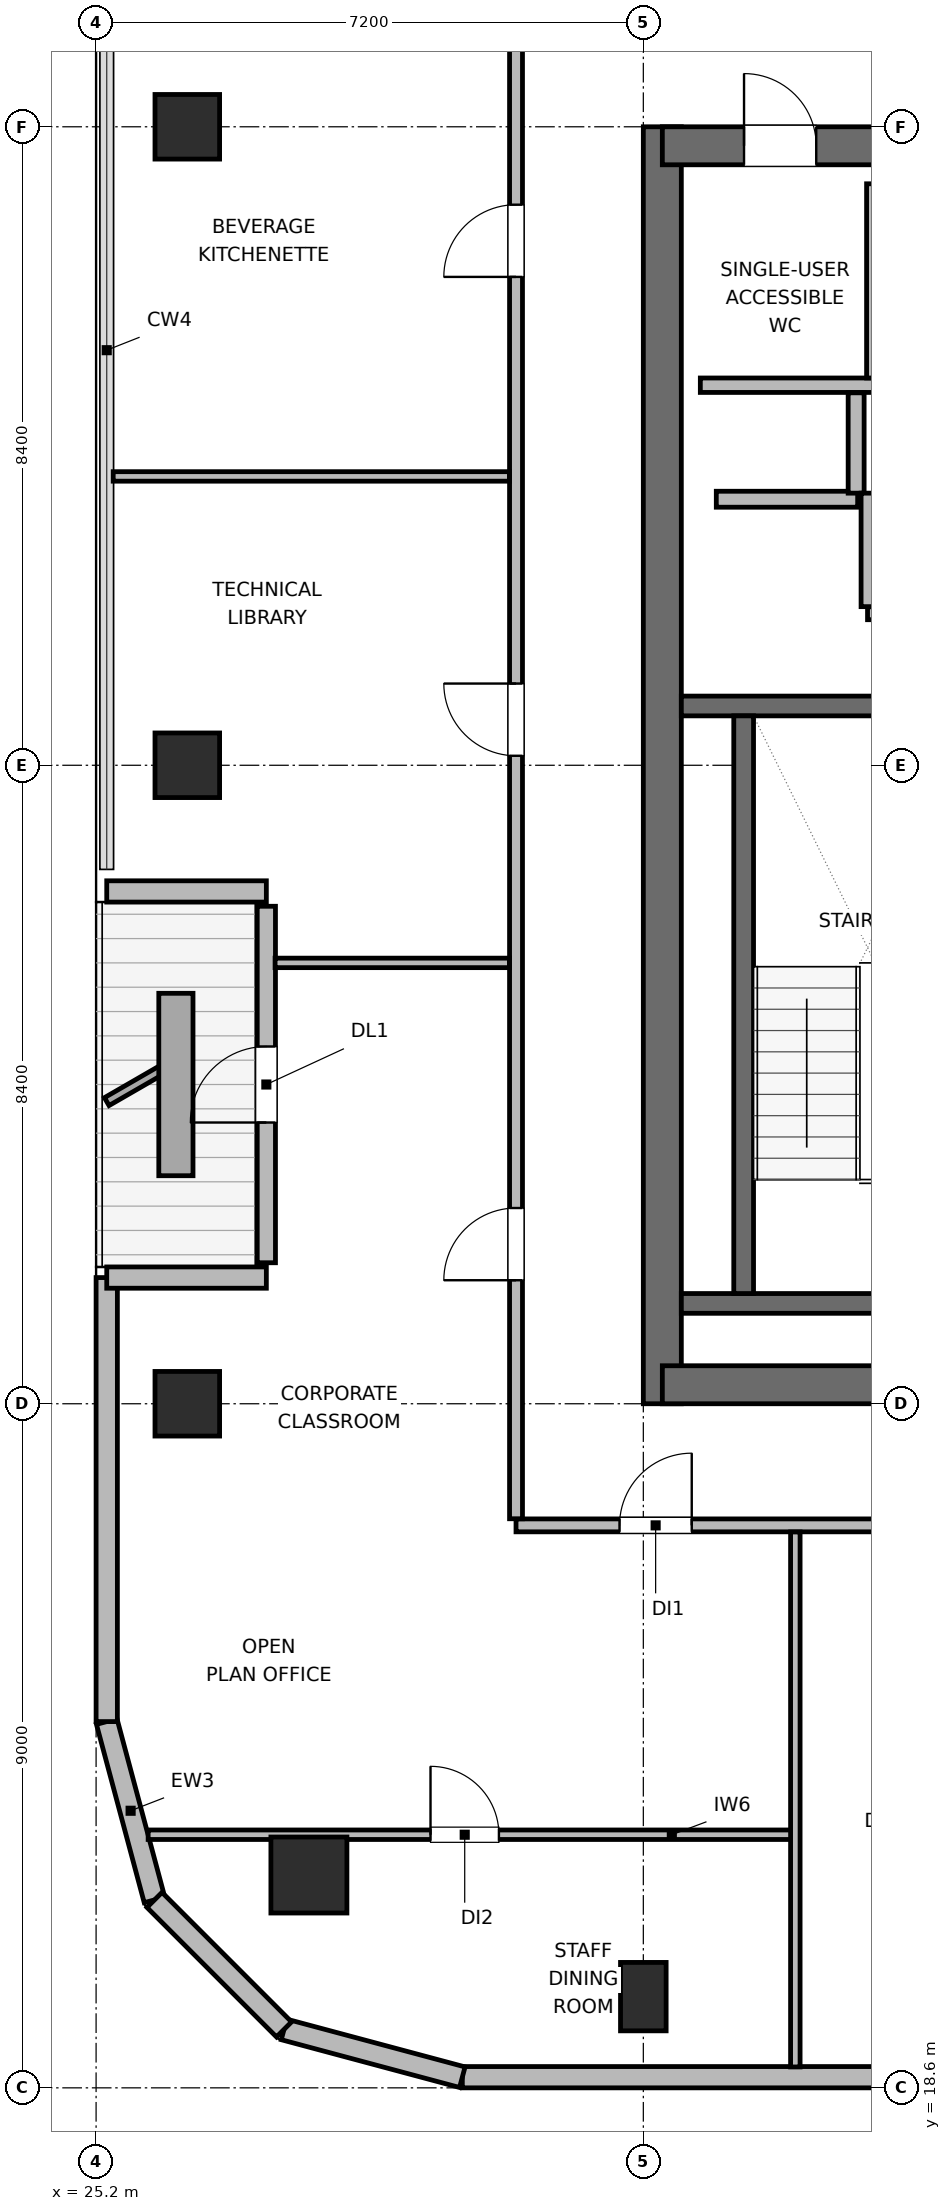
"""IFC4 building model, lengths in metres.
Left out: names, types, materials, properties, quantities, classifications, styles, units other than length and angle.
Written with IfcOpenShell. Run it as: python <this file> out.ifc"""

import sys

from ifc_helpers import new_model, si_unit, direction, frame, frame_2d, origin, origin_2d, place, context, subcontext, project, spatial, rectangle, circle, extrude, element, fill, save


model = new_model("IFC4")
c1 = context("Model", 3, precision=1e-05, world=origin(), true_north=direction((0.0, 1.0)))
c2 = subcontext(c1, "Body", "Model", "MODEL_VIEW")
j1 = project(units=[si_unit("LENGTHUNIT", "METRE"), si_unit("PLANEANGLEUNIT", "RADIAN")], contexts=[c1])
p1 = place(None, origin())
s1 = spatial("IfcSite", under=j1, at=p1, CompositionType="ELEMENT")
p2 = place(p1, origin())
s2 = spatial("IfcBuilding", under=s1, at=p2, CompositionType="ELEMENT")
p3 = place(p2, frame((0.0, 0.0, 302.4)))
s3 = spatial("IfcBuildingStorey", under=s2, at=p3, CompositionType="ELEMENT", Elevation=302.4)
p4 = place(p3, frame((32.65, 27.6, 0.0), z_axis=(0.0, 0.0, 1.0), x_axis=(0.0, 1.0, 0.0)))
e1 = element("IfcWall", 1, at=p4, inside=s3, PredefinedType="SHEAR", context=c2, shape_type="SweptSolid", body=[
    extrude(rectangle(XDim=16.8, YDim=0.5, at=frame_2d((8.4, 0.0))), origin(), (0.0, 0.0, 1.0), 3.9),
])
p5 = place(p3, frame((32.65, 27.85, 0.0), z_axis=(0.0, 0.0, 1.0), x_axis=(1.0, 0.0, 0.0)))
e2 = element("IfcWall", 2, at=p5, inside=s3, PredefinedType="SHEAR", context=c2, shape_type="SweptSolid", body=[
    extrude(rectangle(XDim=9.5, YDim=0.5, at=frame_2d((4.75, 0.0))), origin(), (0.0, 0.0, 1.0), 3.9),
])
p6 = place(p5, frame((5.075, 0.0, 0.0)))
e3 = element("IfcOpeningElement", 3, at=p6, cuts=e2, PredefinedType="OPENING", context=c2, shape_type="SweptSolid", body=[
    extrude(rectangle(XDim=1.05, YDim=2.04, at=frame_2d((0.525, 1.02))), frame((0.0, 0.26, 0.0), z_axis=(0.0, -1.0, 0.0), x_axis=(1.0, 0.0, 0.0)), (0.0, 0.0, 1.0), 0.52),
])
p7 = place(p3, frame((32.65, 44.15, 0.0), z_axis=(0.0, 0.0, 1.0), x_axis=(1.0, 0.0, 0.0)))
e4 = element("IfcWall", 4, at=p7, inside=s3, PredefinedType="SHEAR", context=c2, shape_type="SweptSolid", body=[
    extrude(rectangle(XDim=9.5, YDim=0.5, at=frame_2d((4.75, 0.0))), origin(), (0.0, 0.0, 1.0), 3.9),
])
p8 = place(p7, frame((1.075, 0.0, 0.0)))
e5 = element("IfcOpeningElement", 5, at=p8, cuts=e4, PredefinedType="OPENING", context=c2, shape_type="SweptSolid", body=[
    extrude(rectangle(XDim=0.95, YDim=2.04, at=frame_2d((0.475, 1.02))), frame((0.0, 0.26, 0.0), z_axis=(0.0, -1.0, 0.0), x_axis=(1.0, 0.0, 0.0)), (0.0, 0.0, 1.0), 0.52),
])
p9 = place(p7, frame((4.325, 0.0, 0.0)))
e6 = element("IfcOpeningElement", 6, at=p9, cuts=e4, PredefinedType="OPENING", context=c2, shape_type="SweptSolid", body=[
    extrude(rectangle(XDim=0.9, YDim=2.02, at=frame_2d((0.45, 1.01))), frame((0.0, 0.26, 0.0), z_axis=(0.0, -1.0, 0.0), x_axis=(1.0, 0.0, 0.0)), (0.0, 0.0, 1.0), 0.52),
])
p10 = place(p7, frame((7.225, 0.0, 0.0)))
e7 = element("IfcOpeningElement", 7, at=p10, cuts=e4, PredefinedType="OPENING", context=c2, shape_type="SweptSolid", body=[
    extrude(rectangle(XDim=0.9, YDim=2.02, at=frame_2d((0.45, 1.01))), frame((0.0, 0.26, 0.0), z_axis=(0.0, -1.0, 0.0), x_axis=(1.0, 0.0, 0.0)), (0.0, 0.0, 1.0), 0.52),
])
for number, where, z_axis, x_axis in (
    (8, (32.9, 28.92, 0.0), (0.0, 0.0, 1.0), (1.0, 0.0, 0.0)),
    (9, (32.9, 36.78, 0.0), (0.0, 0.0, 1.0), (1.0, 0.0, 0.0)),
):
    element("IfcWall", number, at=place(p3, frame(where, z_axis=z_axis, x_axis=x_axis)), inside=s3, PredefinedType="SHEAR", context=c2, shape_type="SweptSolid", body=[
        extrude(rectangle(XDim=4.21, YDim=0.26, at=frame_2d((2.105, 0.0))), origin(), (0.0, 0.0, 1.0), 3.9),
    ])
p11 = place(p3, frame((33.72, 29.05, 0.0), z_axis=(0.0, 0.0, 1.0), x_axis=(0.0, 1.0, 0.0)))
e10 = element("IfcWall", 10, at=p11, inside=s3, PredefinedType="SHEAR", context=c2, shape_type="SweptSolid", body=[
    extrude(rectangle(XDim=7.6, YDim=0.26, at=frame_2d((3.8, 0.0))), origin(), (0.0, 0.0, 1.0), 3.9),
])
p12 = place(p3, frame((28.0, 21.4, 0.0), z_axis=(0.0, 0.0, 1.0), x_axis=(1.0, 0.0, 0.0)))
e11 = element("IfcColumn", 11, at=p12, inside=s3, PredefinedType="COLUMN", context=c2, shape_type="SweptSolid", body=[
    extrude(circle(Radius=0.5, at=origin_2d()), origin(), (0.0, 0.0, 1.0), 3.9),
])
p13 = place(p3, frame((32.4, 19.8, 0.0), z_axis=(0.0, 0.0, 1.0), x_axis=(1.0, 0.0, 0.0)))
e12 = element("IfcColumn", 12, at=p13, inside=s3, PredefinedType="COLUMN", context=c2, shape_type="SweptSolid", body=[
    extrude(rectangle(XDim=0.6, YDim=0.9, at=origin_2d()), origin(), (0.0, 0.0, 1.0), 3.9),
])
for number, where, z_axis, x_axis in (
    (13, (26.4, 27.6, 0.0), (0.0, 0.0, 1.0), (1.0, 0.0, 0.0)),
    (14, (26.4, 36.0, 0.0), (0.0, 0.0, 1.0), (1.0, 0.0, 0.0)),
    (15, (26.4, 44.4, 0.0), (0.0, 0.0, 1.0), (1.0, 0.0, 0.0)),
):
    element("IfcColumn", number, at=place(p3, frame(where, z_axis=z_axis, x_axis=x_axis)), inside=s3, PredefinedType="COLUMN", context=c2, shape_type="SweptSolid", body=[
        extrude(rectangle(XDim=0.85, YDim=0.85, at=origin_2d()), origin(), (0.0, 0.0, 1.0), 3.9),
    ])
p14 = place(p3, frame((25.969, 21.073, 0.0), z_axis=(0.0, 0.0, 1.0), x_axis=(-0.258751159445, 0.965944013639, 0.0)))
e16 = element("IfcWall", 16, at=p14, inside=s3, PredefinedType="SOLIDWALL", context=c2, shape_type="SweptSolid", body=[
    extrude(rectangle(XDim=2.429, YDim=0.28, at=frame_2d((1.214, 0.0))), origin(), (0.0, 0.0, 1.0), 3.68),
])
p15 = place(p3, frame((25.34, 23.418, 0.0), z_axis=(0.0, 0.0, 1.0), x_axis=(0.0, 1.0, 0.0)))
e17 = element("IfcWall", 17, at=p15, inside=s3, PredefinedType="SOLIDWALL", context=c2, shape_type="SweptSolid", body=[
    extrude(rectangle(XDim=5.842, YDim=0.28, at=frame_2d((2.921, 0.0))), origin(), (0.0, 0.0, 1.0), 3.68),
])
p16 = place(p3, frame((25.34, 29.26, 0.0), z_axis=(0.0, 0.0, 1.0), x_axis=(1.0, 0.0, 0.0)))
e18 = element("IfcWall", 18, at=p16, inside=s3, PredefinedType="SOLIDWALL", context=c2, shape_type="SweptSolid", body=[
    extrude(rectangle(XDim=2.1, YDim=0.28, at=frame_2d((1.05, 0.0))), origin(), (0.0, 0.0, 1.0), 3.126),
])
p17 = place(p3, frame((27.44, 29.455, 0.0), z_axis=(0.0, 0.0, 1.0), x_axis=(0.0, 1.0, 0.0)))
e19 = element("IfcWall", 19, at=p17, inside=s3, PredefinedType="SOLIDWALL", context=c2, shape_type="SweptSolid", body=[
    extrude(rectangle(XDim=4.69, YDim=0.24, at=frame_2d((2.345, 0.0))), origin(), (0.0, 0.0, 1.0), 3.311),
])
p18 = place(p17, frame((1.845, 0.0, 0.0)))
e20 = element("IfcOpeningElement", 20, at=p18, cuts=e19, PredefinedType="OPENING", context=c2, shape_type="SweptSolid", body=[
    extrude(rectangle(XDim=1.0, YDim=2.02, at=frame_2d((0.5, 1.01))), frame((0.0, 0.13, 0.0), z_axis=(0.0, -1.0, 0.0), x_axis=(1.0, 0.0, 0.0)), (0.0, 0.0, 1.0), 0.26),
])
p19 = place(p3, frame((27.44, 34.34, 0.0), z_axis=(0.0, 0.0, 1.0), x_axis=(-1.0, 0.0, 0.0)))
e21 = element("IfcWall", 21, at=p19, inside=s3, PredefinedType="SOLIDWALL", context=c2, shape_type="SweptSolid", body=[
    extrude(rectangle(XDim=2.1, YDim=0.28, at=frame_2d((1.05, 0.0))), origin(), (0.0, 0.0, 1.0), 3.126),
])
p20 = place(p3, frame((41.369, 18.74, 0.0), z_axis=(0.0, 0.0, 1.0), x_axis=(-1.0, 0.0, 0.0)))
e22 = element("IfcWall", 22, at=p20, inside=s3, PredefinedType="SOLIDWALL", context=c2, shape_type="SweptSolid", body=[
    extrude(rectangle(XDim=11.351, YDim=0.28, at=frame_2d((5.675, 0.0))), origin(), (0.0, 0.0, 1.0), 3.68),
])
p21 = place(p3, frame((30.018, 18.74, 0.0), z_axis=(0.0, 0.0, 1.0), x_axis=(-0.965937282298, 0.25877628691, 0.0)))
e23 = element("IfcWall", 23, at=p21, inside=s3, PredefinedType="SOLIDWALL", context=c2, shape_type="SweptSolid", body=[
    extrude(rectangle(XDim=2.428, YDim=0.28, at=frame_2d((1.214, 0.0))), origin(), (0.0, 0.0, 1.0), 3.68),
])
p22 = place(p3, frame((27.673, 19.368, 0.0), z_axis=(0.0, 0.0, 1.0), x_axis=(-0.707106781187, 0.707106781187, 0.0)))
e24 = element("IfcWall", 24, at=p22, inside=s3, PredefinedType="SOLIDWALL", context=c2, shape_type="SweptSolid", body=[
    extrude(rectangle(XDim=2.41, YDim=0.28, at=frame_2d((1.205, 0.0))), origin(), (0.0, 0.0, 1.0), 3.68),
])
p23 = place(p3, frame((33.15, 41.0, 0.0), z_axis=(0.0, 0.0, 1.0), x_axis=(1.0, 0.0, 0.0)))
e25 = element("IfcWall", 25, at=p23, inside=s3, PredefinedType="PLUMBINGWALL", context=c2, shape_type="SweptSolid", body=[
    extrude(rectangle(XDim=8.5, YDim=0.19, at=frame_2d((4.25, 0.0))), origin(), (0.0, 0.0, 1.0), 3.68),
])
p24 = place(p3, frame((35.4, 41.095, 0.0), z_axis=(0.0, 0.0, 1.0), x_axis=(0.0, 1.0, 0.0)))
e26 = element("IfcWall", 26, at=p24, inside=s3, PredefinedType="PARTITIONING", context=c2, shape_type="SweptSolid", body=[
    extrude(rectangle(XDim=2.555, YDim=0.125, at=frame_2d((1.277, 0.0))), origin(), (0.0, 0.0, 1.0), 3.68),
])
p25 = place(p3, frame((33.36, 39.5, 0.0), z_axis=(0.0, 0.0, 1.0), x_axis=(1.0, 0.0, 0.0)))
e27 = element("IfcWall", 27, at=p25, inside=s3, PredefinedType="PARTITIONING", context=c2, shape_type="SweptSolid", body=[
    extrude(rectangle(XDim=1.86, YDim=0.21, at=frame_2d((0.93, 0.0))), origin(), (0.0, 0.0, 1.0), 3.68),
])
p26 = place(p3, frame((35.2, 39.58, 0.0), z_axis=(0.0, 0.0, 1.0), x_axis=(0.0, 1.0, 0.0)))
e28 = element("IfcWall", 28, at=p26, inside=s3, PredefinedType="PARTITIONING", context=c2, shape_type="SweptSolid", body=[
    extrude(rectangle(XDim=1.32, YDim=0.21, at=frame_2d((0.66, 0.0))), origin(), (0.0, 0.0, 1.0), 3.68),
])
p27 = place(p3, frame((35.35, 38.0, 0.0), z_axis=(0.0, 0.0, 1.0), x_axis=(1.0, 0.0, 0.0)))
e29 = element("IfcWall", 29, at=p27, inside=s3, PredefinedType="PARTITIONING", context=c2, shape_type="SweptSolid", body=[
    extrude(rectangle(XDim=6.1, YDim=0.17, at=frame_2d((3.05, 0.0))), origin(), (0.0, 0.0, 1.0), 3.68),
])
p28 = place(p27, frame((0.556, 0.0, 0.0)))
e30 = element("IfcOpeningElement", 30, at=p28, cuts=e29, PredefinedType="OPENING", context=c2, shape_type="SweptSolid", body=[
    extrude(rectangle(XDim=0.9, YDim=2.02, at=frame_2d((0.45, 1.01))), frame((0.0, 0.095, 0.0), z_axis=(0.0, -1.0, 0.0), x_axis=(1.0, 0.0, 0.0)), (0.0, 0.0, 1.0), 0.19),
])
p29 = place(p27, frame((2.6, 0.0, 0.0)))
e31 = element("IfcOpeningElement", 31, at=p29, cuts=e29, PredefinedType="OPENING", context=c2, shape_type="SweptSolid", body=[
    extrude(rectangle(XDim=0.9, YDim=2.02, at=frame_2d((0.45, 1.01))), frame((0.0, 0.095, 0.0), z_axis=(0.0, -1.0, 0.0), x_axis=(1.0, 0.0, 0.0)), (0.0, 0.0, 1.0), 0.19),
])
p30 = place(p27, frame((4.643, 0.0, 0.0)))
e32 = element("IfcOpeningElement", 32, at=p30, cuts=e29, PredefinedType="OPENING", context=c2, shape_type="SweptSolid", body=[
    extrude(rectangle(XDim=0.9, YDim=2.02, at=frame_2d((0.45, 1.01))), frame((0.0, 0.095, 0.0), z_axis=(0.0, -1.0, 0.0), x_axis=(1.0, 0.0, 0.0)), (0.0, 0.0, 1.0), 0.19),
])
p31 = place(p3, frame((35.35, 38.087, 0.0), z_axis=(0.0, 0.0, 1.0), x_axis=(0.0, 1.0, 0.0)))
e33 = element("IfcWall", 33, at=p31, inside=s3, PredefinedType="PARTITIONING", context=c2, shape_type="SweptSolid", body=[
    extrude(rectangle(XDim=1.493, YDim=0.17, at=frame_2d((0.747, 0.0))), origin(), (0.0, 0.0, 1.0), 3.68),
])
p32 = place(p3, frame((30.725, 26.0, 0.0), z_axis=(0.0, 0.0, 1.0), x_axis=(1.0, 0.0, 0.0)))
e34 = element("IfcWall", 34, at=p32, inside=s3, PredefinedType="PARTITIONING", context=c2, shape_type="SweptSolid", body=[
    extrude(rectangle(XDim=32.875, YDim=0.17, at=frame_2d((16.438, 0.0))), origin(), (0.0, 0.0, 1.0), 3.68),
])
p33 = place(p32, frame((1.362, 0.0, 0.0)))
e35 = element("IfcOpeningElement", 35, at=p33, cuts=e34, PredefinedType="OPENING", context=c2, shape_type="SweptSolid", body=[
    extrude(rectangle(XDim=0.95, YDim=2.04, at=frame_2d((0.475, 1.02))), frame((0.0, 0.095, 0.0), z_axis=(0.0, -1.0, 0.0), x_axis=(1.0, 0.0, 0.0)), (0.0, 0.0, 1.0), 0.19),
])
p34 = place(p32, frame((5.0, 0.0, 0.0)))
e36 = element("IfcOpeningElement", 36, at=p34, cuts=e34, PredefinedType="OPENING", context=c2, shape_type="SweptSolid", body=[
    extrude(rectangle(XDim=0.95, YDim=2.04, at=frame_2d((0.475, 1.02))), frame((0.0, 0.095, 0.0), z_axis=(0.0, -1.0, 0.0), x_axis=(1.0, 0.0, 0.0)), (0.0, 0.0, 1.0), 0.19),
])
p35 = place(p32, frame((8.6, 0.0, 0.0)))
e37 = element("IfcOpeningElement", 37, at=p35, cuts=e34, PredefinedType="OPENING", context=c2, shape_type="SweptSolid", body=[
    extrude(rectangle(XDim=0.95, YDim=2.04, at=frame_2d((0.475, 1.02))), frame((0.0, 0.095, 0.0), z_axis=(0.0, -1.0, 0.0), x_axis=(1.0, 0.0, 0.0)), (0.0, 0.0, 1.0), 0.19),
])
p36 = place(p32, frame((13.1, 0.0, 0.0)))
e38 = element("IfcOpeningElement", 38, at=p36, cuts=e34, PredefinedType="OPENING", context=c2, shape_type="SweptSolid", body=[
    extrude(rectangle(XDim=0.95, YDim=2.04, at=frame_2d((0.475, 1.02))), frame((0.0, 0.095, 0.0), z_axis=(0.0, -1.0, 0.0), x_axis=(1.0, 0.0, 0.0)), (0.0, 0.0, 1.0), 0.19),
])
p37 = place(p32, frame((18.0, 0.0, 0.0)))
e39 = element("IfcOpeningElement", 39, at=p37, cuts=e34, PredefinedType="OPENING", context=c2, shape_type="SweptSolid", body=[
    extrude(rectangle(XDim=0.95, YDim=2.04, at=frame_2d((0.475, 1.02))), frame((0.0, 0.095, 0.0), z_axis=(0.0, -1.0, 0.0), x_axis=(1.0, 0.0, 0.0)), (0.0, 0.0, 1.0), 0.19),
])
p38 = place(p32, frame((22.4, 0.0, 0.0)))
e40 = element("IfcOpeningElement", 40, at=p38, cuts=e34, PredefinedType="OPENING", context=c2, shape_type="SweptSolid", body=[
    extrude(rectangle(XDim=0.95, YDim=2.04, at=frame_2d((0.475, 1.02))), frame((0.0, 0.095, 0.0), z_axis=(0.0, -1.0, 0.0), x_axis=(1.0, 0.0, 0.0)), (0.0, 0.0, 1.0), 0.19),
])
p39 = place(p32, frame((26.8, 0.0, 0.0)))
e41 = element("IfcOpeningElement", 41, at=p39, cuts=e34, PredefinedType="OPENING", context=c2, shape_type="SweptSolid", body=[
    extrude(rectangle(XDim=0.95, YDim=2.04, at=frame_2d((0.475, 1.02))), frame((0.0, 0.095, 0.0), z_axis=(0.0, -1.0, 0.0), x_axis=(1.0, 0.0, 0.0)), (0.0, 0.0, 1.0), 0.19),
])
p40 = place(p32, frame((30.7, 0.0, 0.0)))
e42 = element("IfcOpeningElement", 42, at=p40, cuts=e34, PredefinedType="OPENING", context=c2, shape_type="SweptSolid", body=[
    extrude(rectangle(XDim=0.95, YDim=2.04, at=frame_2d((0.475, 1.02))), frame((0.0, 0.095, 0.0), z_axis=(0.0, -1.0, 0.0), x_axis=(1.0, 0.0, 0.0)), (0.0, 0.0, 1.0), 0.19),
])
p41 = place(p3, frame((30.725, 26.087, 0.0), z_axis=(0.0, 0.0, 1.0), x_axis=(0.0, 1.0, 0.0)))
e43 = element("IfcWall", 43, at=p41, inside=s3, PredefinedType="PARTITIONING", context=c2, shape_type="SweptSolid", body=[
    extrude(rectangle(XDim=19.826, YDim=0.17, at=frame_2d((9.913, 0.0))), origin(), (0.0, 0.0, 1.0), 3.68),
])
p42 = place(p41, frame((3.138, 0.0, 0.0)))
e44 = element("IfcOpeningElement", 44, at=p42, cuts=e43, PredefinedType="OPENING", context=c2, shape_type="SweptSolid", body=[
    extrude(rectangle(XDim=0.95, YDim=2.04, at=frame_2d((0.475, 1.02))), frame((0.0, 0.095, 0.0), z_axis=(0.0, -1.0, 0.0), x_axis=(1.0, 0.0, 0.0)), (0.0, 0.0, 1.0), 0.19),
])
p43 = place(p41, frame((10.038, 0.0, 0.0)))
e45 = element("IfcOpeningElement", 45, at=p43, cuts=e43, PredefinedType="OPENING", context=c2, shape_type="SweptSolid", body=[
    extrude(rectangle(XDim=0.95, YDim=2.04, at=frame_2d((0.475, 1.02))), frame((0.0, 0.095, 0.0), z_axis=(0.0, -1.0, 0.0), x_axis=(1.0, 0.0, 0.0)), (0.0, 0.0, 1.0), 0.19),
])
p44 = place(p41, frame((16.338, 0.0, 0.0)))
e46 = element("IfcOpeningElement", 46, at=p44, cuts=e43, PredefinedType="OPENING", context=c2, shape_type="SweptSolid", body=[
    extrude(rectangle(XDim=0.95, YDim=2.04, at=frame_2d((0.475, 1.02))), frame((0.0, 0.095, 0.0), z_axis=(0.0, -1.0, 0.0), x_axis=(1.0, 0.0, 0.0)), (0.0, 0.0, 1.0), 0.19),
])
p45 = place(p3, frame((25.885, 21.93, 0.0), z_axis=(0.0, 0.0, 1.0), x_axis=(1.0, 0.0, 0.0)))
e47 = element("IfcWall", 47, at=p45, inside=s3, PredefinedType="PARTITIONING", context=c2, shape_type="SweptSolid", body=[
    extrude(rectangle(XDim=8.515, YDim=0.125, at=frame_2d((4.257, 0.0))), origin(), (0.0, 0.0, 1.0), 3.68),
])
p46 = place(p45, frame((3.715, 0.0, 0.0)))
e48 = element("IfcOpeningElement", 48, at=p46, cuts=e47, PredefinedType="OPENING", context=c2, shape_type="SweptSolid", body=[
    extrude(rectangle(XDim=0.9, YDim=2.02, at=frame_2d((0.45, 1.01))), frame((0.0, 0.073, 0.0), z_axis=(0.0, -1.0, 0.0), x_axis=(1.0, 0.0, 0.0)), (0.0, 0.0, 1.0), 0.145),
])
p47 = place(p3, frame((34.4, 18.875, 0.0), z_axis=(0.0, 0.0, 1.0), x_axis=(0.0, 1.0, 0.0)))
e49 = element("IfcWall", 49, at=p47, inside=s3, PredefinedType="PARTITIONING", context=c2, shape_type="SweptSolid", body=[
    extrude(rectangle(XDim=7.038, YDim=0.125, at=frame_2d((3.519, 0.0))), origin(), (0.0, 0.0, 1.0), 3.68),
])
p48 = place(p3, frame((27.555, 33.4, 0.0), z_axis=(0.0, 0.0, 1.0), x_axis=(1.0, 0.0, 0.0)))
e50 = element("IfcWall", 50, at=p48, inside=s3, PredefinedType="PARTITIONING", context=c2, shape_type="SweptSolid", body=[
    extrude(rectangle(XDim=3.083, YDim=0.125, at=frame_2d((1.542, 0.0))), origin(), (0.0, 0.0, 1.0), 3.68),
])
p49 = place(p3, frame((25.425, 39.8, 0.0), z_axis=(0.0, 0.0, 1.0), x_axis=(1.0, 0.0, 0.0)))
e51 = element("IfcWall", 51, at=p49, inside=s3, PredefinedType="PARTITIONING", context=c2, shape_type="SweptSolid", body=[
    extrude(rectangle(XDim=5.213, YDim=0.125, at=frame_2d((2.606, 0.0))), origin(), (0.0, 0.0, 1.0), 3.68),
])
p50 = place(p18, origin())
e52 = element("IfcDoor", 52, at=p50, inside=s3, OperationType="SINGLE_SWING_LEFT", PredefinedType="DOOR", context=c2, shape_type="SweptSolid", body=[
    extrude(rectangle(XDim=1.0, YDim=2.02, at=frame_2d((0.5, 1.01))), frame((0.0, 0.025, 0.0), z_axis=(0.0, -1.0, 0.0), x_axis=(1.0, 0.0, 0.0)), (0.0, 0.0, 1.0), 0.05),
])
fill(e20, e52)
p51 = place(p8, origin())
e53 = element("IfcDoor", 53, at=p51, inside=s3, OperationType="SINGLE_SWING_LEFT", PredefinedType="DOOR", context=c2, shape_type="SweptSolid", body=[
    extrude(rectangle(XDim=0.95, YDim=2.04, at=frame_2d((0.475, 1.02))), frame((0.0, 0.025, 0.0), z_axis=(0.0, -1.0, 0.0), x_axis=(1.0, 0.0, 0.0)), (0.0, 0.0, 1.0), 0.05),
])
fill(e5, e53)
p52 = place(p46, origin())
e54 = element("IfcDoor", 54, at=p52, inside=s3, OperationType="SINGLE_SWING_LEFT", PredefinedType="DOOR", context=c2, shape_type="SweptSolid", body=[
    extrude(rectangle(XDim=0.9, YDim=2.02, at=frame_2d((0.45, 1.01))), frame((0.0, 0.025, 0.0), z_axis=(0.0, -1.0, 0.0), x_axis=(1.0, 0.0, 0.0)), (0.0, 0.0, 1.0), 0.05),
])
fill(e48, e54)
p53 = place(p33, origin())
e55 = element("IfcDoor", 55, at=p53, inside=s3, OperationType="SINGLE_SWING_RIGHT", PredefinedType="DOOR", context=c2, shape_type="SweptSolid", body=[
    extrude(rectangle(XDim=0.95, YDim=2.04, at=frame_2d((0.475, 1.02))), frame((0.0, 0.025, 0.0), z_axis=(0.0, -1.0, 0.0), x_axis=(1.0, 0.0, 0.0)), (0.0, 0.0, 1.0), 0.05),
])
fill(e35, e55)
p54 = place(p42, origin())
e56 = element("IfcDoor", 56, at=p54, inside=s3, OperationType="SINGLE_SWING_LEFT", PredefinedType="DOOR", context=c2, shape_type="SweptSolid", body=[
    extrude(rectangle(XDim=0.95, YDim=2.04, at=frame_2d((0.475, 1.02))), frame((0.0, 0.025, 0.0), z_axis=(0.0, -1.0, 0.0), x_axis=(1.0, 0.0, 0.0)), (0.0, 0.0, 1.0), 0.05),
])
fill(e44, e56)
p55 = place(p43, origin())
e57 = element("IfcDoor", 57, at=p55, inside=s3, OperationType="SINGLE_SWING_RIGHT", PredefinedType="DOOR", context=c2, shape_type="SweptSolid", body=[
    extrude(rectangle(XDim=0.95, YDim=2.04, at=frame_2d((0.475, 1.02))), frame((0.0, 0.025, 0.0), z_axis=(0.0, -1.0, 0.0), x_axis=(1.0, 0.0, 0.0)), (0.0, 0.0, 1.0), 0.05),
])
fill(e45, e57)
p56 = place(p44, origin())
e58 = element("IfcDoor", 58, at=p56, inside=s3, OperationType="SINGLE_SWING_LEFT", PredefinedType="DOOR", context=c2, shape_type="SweptSolid", body=[
    extrude(rectangle(XDim=0.95, YDim=2.04, at=frame_2d((0.475, 1.02))), frame((0.0, 0.025, 0.0), z_axis=(0.0, -1.0, 0.0), x_axis=(1.0, 0.0, 0.0)), (0.0, 0.0, 1.0), 0.05),
])
fill(e46, e58)
save(model, sys.argv[1])
